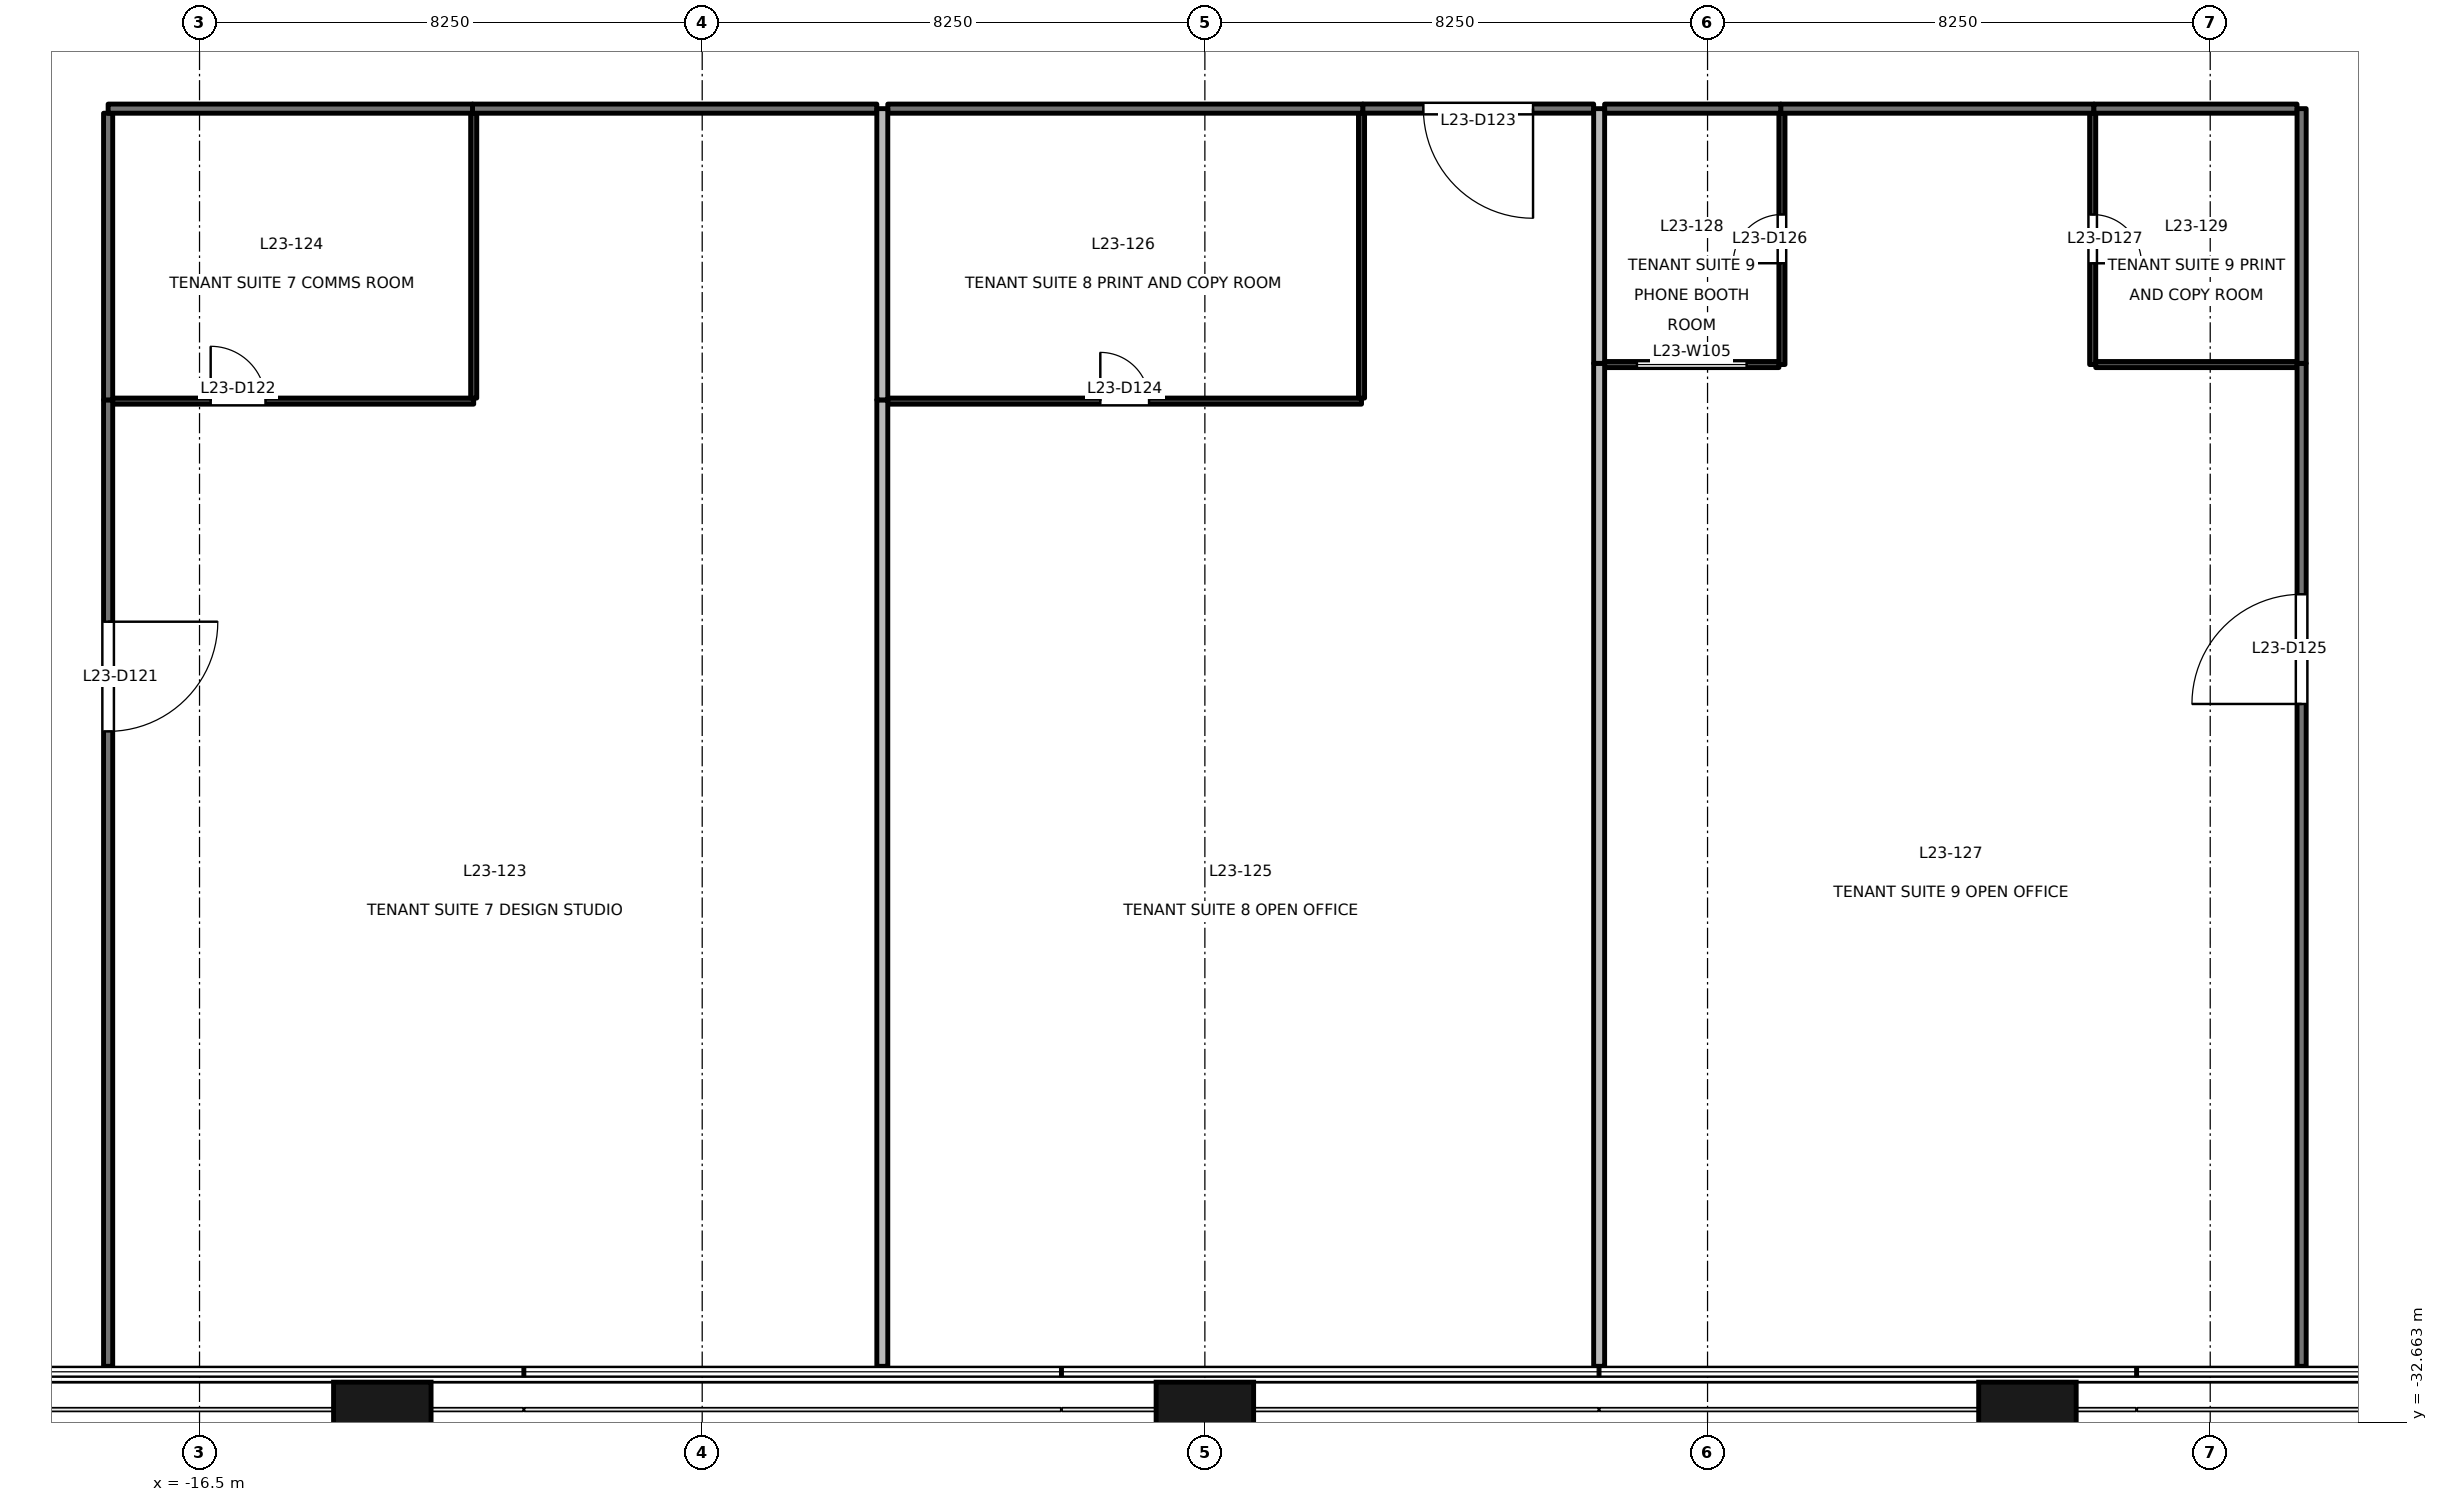
"""IFC4 building model, lengths in metres.
Left out: names, types, materials, properties, quantities, classifications, styles, units other than length and angle.
Written with IfcOpenShell. Run it as: python <this file> out.ifc"""

import sys

from ifc_helpers import new_model, si_unit, direction, frame, frame_2d, origin, origin_2d, place, context, subcontext, project, spatial, rectangle, extrude, element, fill, save


model = new_model("IFC4")
c1 = context("Model", 3, precision=1e-05, world=origin(), true_north=direction((0.0, 1.0)))
c2 = subcontext(c1, "Body", "Model", "MODEL_VIEW")
j1 = project(units=[si_unit("LENGTHUNIT", "METRE"), si_unit("PLANEANGLEUNIT", "RADIAN")], contexts=[c1])
p1 = place(None, origin())
s1 = spatial("IfcSite", under=j1, at=p1, CompositionType="ELEMENT")
p2 = place(p1, origin())
s2 = spatial("IfcBuilding", under=s1, at=p2, CompositionType="ELEMENT")
p3 = place(p2, frame((0.0, 0.0, 103.7)))
s3 = spatial("IfcBuildingStorey", under=s2, at=p3, CompositionType="ELEMENT", Elevation=103.7)
for number, where, z_axis, x_axis in (
    (1, (-13.5, -32.9, -0.2), (0.0, 0.0, 1.0), (1.0, 0.0, 0.0)),
    (2, (0.0, -32.9, -0.2), (0.0, 0.0, 1.0), (1.0, 0.0, 0.0)),
    (3, (13.5, -32.9, -0.2), (0.0, 0.0, 1.0), (1.0, 0.0, 0.0)),
):
    element("IfcColumn", number, at=place(p3, frame(where, z_axis=z_axis, x_axis=x_axis)), inside=s3, PredefinedType="COLUMN", context=c2, shape_type="SweptSolid", body=[
        extrude(rectangle(XDim=1.6, YDim=1.8, at=origin_2d()), origin(), (0.0, 0.0, 1.0), 4.0),
    ])
p4 = place(p3, frame((-18.0, -15.88, 0.0), z_axis=(0.0, 0.0, 1.0), x_axis=(0.0, -1.0, 0.0)))
e4 = element("IfcWall", 4, at=p4, inside=s3, PredefinedType="PARTITIONING", context=c2, shape_type="SweptSolid", body=[
    extrude(rectangle(XDim=15.86, YDim=0.15, at=frame_2d((7.93, 0.0))), origin(), (0.0, 0.0, 1.0), 3.8),
])
p5 = place(p4, frame((3.64, 0.0, 0.0)))
e5 = element("IfcOpeningElement", 5, at=p5, cuts=e4, PredefinedType="OPENING", context=c2, shape_type="SweptSolid", body=[
    extrude(rectangle(XDim=1.8, YDim=2.1, at=frame_2d((0.9, 1.05))), frame((0.0, 0.085, 0.0), z_axis=(0.0, -1.0, 0.0), x_axis=(1.0, 0.0, 0.0)), (0.0, 0.0, 1.0), 0.171),
])
p6 = place(p3, frame((-5.384, -11.1, 0.0), z_axis=(0.0, 0.0, 1.0), x_axis=(-1.0, 0.0, 0.0)))
e6 = element("IfcWall", 6, at=p6, inside=s3, PredefinedType="PARTITIONING", context=c2, shape_type="SweptSolid", body=[
    extrude(rectangle(XDim=6.636, YDim=0.15, at=frame_2d((3.318, 0.0))), origin(), (0.0, 0.0, 1.0), 2.8),
])
p7 = place(p3, frame((-18.0, -11.175, 0.0), z_axis=(0.0, 0.0, 1.0), x_axis=(0.0, -1.0, 0.0)))
e7 = element("IfcWall", 7, at=p7, inside=s3, PredefinedType="PARTITIONING", context=c2, shape_type="SweptSolid", body=[
    extrude(rectangle(XDim=4.705, YDim=0.15, at=frame_2d((2.353, 0.0))), origin(), (0.0, 0.0, 1.0), 3.8),
])
p8 = place(p3, frame((-12.02, -11.1, 0.0), z_axis=(0.0, 0.0, 1.0), x_axis=(-1.0, 0.0, 0.0)))
e8 = element("IfcWall", 8, at=p8, inside=s3, PredefinedType="PARTITIONING", context=c2, shape_type="SweptSolid", body=[
    extrude(rectangle(XDim=5.98, YDim=0.15, at=frame_2d((2.99, 0.0))), origin(), (0.0, 0.0, 1.0), 2.8),
])
p9 = place(p3, frame((6.381, -11.099, 0.0), z_axis=(0.0, 0.0, 1.0), x_axis=(-1.0, 0.0, 0.0)))
e9 = element("IfcWall", 9, at=p9, inside=s3, PredefinedType="PARTITIONING", context=c2, shape_type="SweptSolid", body=[
    extrude(rectangle(XDim=3.79, YDim=0.15, at=frame_2d((1.895, 0.0))), origin(), (0.0, 0.0, 1.0), 2.8),
])
p10 = place(p9, frame((0.995, 0.0, 0.0)))
e10 = element("IfcOpeningElement", 10, at=p10, cuts=e9, PredefinedType="OPENING", context=c2, shape_type="SweptSolid", body=[
    extrude(rectangle(XDim=1.8, YDim=2.1, at=frame_2d((0.9, 1.05))), frame((0.0, 0.085, 0.0), z_axis=(0.0, -1.0, 0.0), x_axis=(1.0, 0.0, 0.0)), (0.0, 0.0, 1.0), 0.171),
])
p11 = place(p3, frame((2.591, -11.1, 0.0), z_axis=(0.0, 0.0, 1.0), x_axis=(-1.0, 0.0, 0.0)))
e11 = element("IfcWall", 11, at=p11, inside=s3, PredefinedType="PARTITIONING", context=c2, shape_type="SweptSolid", body=[
    extrude(rectangle(XDim=7.795, YDim=0.15, at=frame_2d((3.897, 0.0))), origin(), (0.0, 0.0, 1.0), 2.8),
])
p12 = place(p3, frame((14.591, -11.1, 0.0), z_axis=(0.0, 0.0, 1.0), x_axis=(-1.0, 0.0, 0.0)))
e12 = element("IfcWall", 12, at=p12, inside=s3, PredefinedType="PARTITIONING", context=c2, shape_type="SweptSolid", body=[
    extrude(rectangle(XDim=5.14, YDim=0.15, at=frame_2d((2.57, 0.0))), origin(), (0.0, 0.0, 1.0), 2.8),
])
p13 = place(p3, frame((18.0, -31.74, 0.0), z_axis=(0.0, 0.0, 1.0), x_axis=(0.0, 1.0, 0.0)))
e13 = element("IfcWall", 13, at=p13, inside=s3, PredefinedType="PARTITIONING", context=c2, shape_type="SweptSolid", body=[
    extrude(rectangle(XDim=16.46, YDim=0.15, at=frame_2d((8.23, 0.0))), origin(), (0.0, 0.0, 1.0), 2.4),
])
p14 = place(p13, frame((10.87, 0.0, 0.0)))
e14 = element("IfcOpeningElement", 14, at=p14, cuts=e13, PredefinedType="OPENING", context=c2, shape_type="SweptSolid", body=[
    extrude(rectangle(XDim=1.8, YDim=2.1, at=frame_2d((0.9, 1.05))), frame((0.0, 0.085, 0.0), z_axis=(0.0, -1.0, 0.0), x_axis=(1.0, 0.0, 0.0)), (0.0, 0.0, 1.0), 0.171),
])
p15 = place(p3, frame((9.451, -11.1, 0.0), z_axis=(0.0, 0.0, 1.0), x_axis=(-1.0, 0.0, 0.0)))
e15 = element("IfcWall", 15, at=p15, inside=s3, PredefinedType="PARTITIONING", context=c2, shape_type="SweptSolid", body=[
    extrude(rectangle(XDim=2.89, YDim=0.15, at=frame_2d((1.445, 0.0))), origin(), (0.0, 0.0, 1.0), 2.8),
])
p16 = place(p3, frame((17.925, -11.1, 0.0), z_axis=(0.0, 0.0, 1.0), x_axis=(-1.0, 0.0, 0.0)))
e16 = element("IfcWall", 16, at=p16, inside=s3, PredefinedType="PARTITIONING", context=c2, shape_type="SweptSolid", body=[
    extrude(rectangle(XDim=3.334, YDim=0.15, at=frame_2d((1.667, 0.0))), origin(), (0.0, 0.0, 1.0), 2.4),
])
p17 = place(p3, frame((18.0, -15.28, 0.0), z_axis=(0.0, 0.0, 1.0), x_axis=(0.0, 1.0, 0.0)))
e17 = element("IfcWall", 17, at=p17, inside=s3, PredefinedType="PARTITIONING", context=c2, shape_type="SweptSolid", body=[
    extrude(rectangle(XDim=4.18, YDim=0.15, at=frame_2d((2.09, 0.0))), origin(), (0.0, 0.0, 1.0), 2.4),
])
p18 = place(p3, frame((-17.925, -15.9, 0.0), z_axis=(0.0, 0.0, 1.0), x_axis=(1.0, 0.0, 0.0)))
e18 = element("IfcWall", 18, at=p18, inside=s3, PredefinedType="PARTITIONING", context=c2, shape_type="SweptSolid", body=[
    extrude(rectangle(XDim=5.925, YDim=0.1, at=frame_2d((2.962, 0.0))), origin(), (0.0, 0.0, 1.0), 2.8),
])
p19 = place(p18, frame((1.608, 0.0, 0.0)))
e19 = element("IfcOpeningElement", 19, at=p19, cuts=e18, PredefinedType="OPENING", context=c2, shape_type="SweptSolid", body=[
    extrude(rectangle(XDim=0.9, YDim=2.1, at=frame_2d((0.45, 1.05))), frame((0.0, 0.061, 0.0), z_axis=(0.0, -1.0, 0.0), x_axis=(1.0, 0.0, 0.0)), (0.0, 0.0, 1.0), 0.121),
])
p20 = place(p3, frame((-12.0, -15.85, 0.0), z_axis=(0.0, 0.0, 1.0), x_axis=(0.0, 1.0, 0.0)))
e20 = element("IfcWall", 20, at=p20, inside=s3, PredefinedType="PARTITIONING", context=c2, shape_type="SweptSolid", body=[
    extrude(rectangle(XDim=4.675, YDim=0.1, at=frame_2d((2.337, 0.0))), origin(), (0.0, 0.0, 1.0), 3.8),
])
p21 = place(p3, frame((-5.294, -15.88, 0.0), z_axis=(0.0, 0.0, 1.0), x_axis=(0.0, -1.0, 0.0)))
e21 = element("IfcWall", 21, at=p21, inside=s3, PredefinedType="PARTITIONING", context=c2, shape_type="SweptSolid", body=[
    extrude(rectangle(XDim=15.86, YDim=0.18, at=frame_2d((7.93, 0.0))), origin(), (0.0, 0.0, 1.0), 3.8),
])
p22 = place(p3, frame((-5.294, -11.1, 0.0), z_axis=(0.0, 0.0, 1.0), x_axis=(0.0, -1.0, 0.0)))
e22 = element("IfcWall", 22, at=p22, inside=s3, PredefinedType="PARTITIONING", context=c2, shape_type="SweptSolid", body=[
    extrude(rectangle(XDim=4.78, YDim=0.18, at=frame_2d((2.39, 0.0))), origin(), (0.0, 0.0, 1.0), 3.8),
])
p23 = place(p3, frame((-5.204, -15.9, 0.0), z_axis=(0.0, 0.0, 1.0), x_axis=(1.0, 0.0, 0.0)))
e23 = element("IfcWall", 23, at=p23, inside=s3, PredefinedType="PARTITIONING", context=c2, shape_type="SweptSolid", body=[
    extrude(rectangle(XDim=7.775, YDim=0.1, at=frame_2d((3.888, 0.0))), origin(), (0.0, 0.0, 1.0), 2.8),
])
p24 = place(p23, frame((3.488, 0.0, 0.0)))
e24 = element("IfcOpeningElement", 24, at=p24, cuts=e23, PredefinedType="OPENING", context=c2, shape_type="SweptSolid", body=[
    extrude(rectangle(XDim=0.8, YDim=2.1, at=frame_2d((0.4, 1.05))), frame((0.0, 0.061, 0.0), z_axis=(0.0, -1.0, 0.0), x_axis=(1.0, 0.0, 0.0)), (0.0, 0.0, 1.0), 0.121),
])
p25 = place(p3, frame((2.571, -15.85, 0.0), z_axis=(0.0, 0.0, 1.0), x_axis=(0.0, 1.0, 0.0)))
e25 = element("IfcWall", 25, at=p25, inside=s3, PredefinedType="PARTITIONING", context=c2, shape_type="SweptSolid", body=[
    extrude(rectangle(XDim=4.675, YDim=0.1, at=frame_2d((2.337, 0.0))), origin(), (0.0, 0.0, 1.0), 3.8),
])
p26 = place(p3, frame((6.471, -15.28, 0.0), z_axis=(0.0, 0.0, 1.0), x_axis=(0.0, -1.0, 0.0)))
e26 = element("IfcWall", 26, at=p26, inside=s3, PredefinedType="PARTITIONING", context=c2, shape_type="SweptSolid", body=[
    extrude(rectangle(XDim=16.46, YDim=0.18, at=frame_2d((8.23, 0.0))), origin(), (0.0, 0.0, 1.0), 3.8),
])
p27 = place(p3, frame((6.471, -11.1, 0.0), z_axis=(0.0, 0.0, 1.0), x_axis=(0.0, -1.0, 0.0)))
e27 = element("IfcWall", 27, at=p27, inside=s3, PredefinedType="PARTITIONING", context=c2, shape_type="SweptSolid", body=[
    extrude(rectangle(XDim=4.18, YDim=0.18, at=frame_2d((2.09, 0.0))), origin(), (0.0, 0.0, 1.0), 3.8),
])
p28 = place(p3, frame((6.561, -15.3, 0.0), z_axis=(0.0, 0.0, 1.0), x_axis=(1.0, 0.0, 0.0)))
e28 = element("IfcWall", 28, at=p28, inside=s3, PredefinedType="PARTITIONING", context=c2, shape_type="SweptSolid", body=[
    extrude(rectangle(XDim=2.86, YDim=0.1, at=frame_2d((1.43, 0.0))), origin(), (0.0, 0.0, 1.0), 2.8),
])
p29 = place(p28, frame((0.53, 0.0, 0.9)))
e29 = element("IfcOpeningElement", 29, at=p29, cuts=e28, PredefinedType="OPENING", context=c2, shape_type="SweptSolid", body=[
    extrude(rectangle(XDim=1.8, YDim=1.2, at=frame_2d((0.9, 0.6))), frame((0.0, 0.061, 0.0), z_axis=(0.0, -1.0, 0.0), x_axis=(1.0, 0.0, 0.0)), (0.0, 0.0, 1.0), 0.121),
])
p30 = place(p3, frame((9.471, -15.3, 0.0), z_axis=(0.0, 0.0, 1.0), x_axis=(0.0, 1.0, 0.0)))
e30 = element("IfcWall", 30, at=p30, inside=s3, PredefinedType="PARTITIONING", context=c2, shape_type="SweptSolid", body=[
    extrude(rectangle(XDim=4.125, YDim=0.1, at=frame_2d((2.062, 0.0))), origin(), (0.0, 0.0, 1.0), 3.8),
])
p31 = place(p30, frame((1.663, 0.0, 0.0)))
e31 = element("IfcOpeningElement", 31, at=p31, cuts=e30, PredefinedType="OPENING", context=c2, shape_type="SweptSolid", body=[
    extrude(rectangle(XDim=0.8, YDim=2.1, at=frame_2d((0.4, 1.05))), frame((0.0, 0.061, 0.0), z_axis=(0.0, -1.0, 0.0), x_axis=(1.0, 0.0, 0.0)), (0.0, 0.0, 1.0), 0.121),
])
p32 = place(p3, frame((14.571, -11.175, 0.0), z_axis=(0.0, 0.0, 1.0), x_axis=(0.0, -1.0, 0.0)))
e32 = element("IfcWall", 32, at=p32, inside=s3, PredefinedType="PARTITIONING", context=c2, shape_type="SweptSolid", body=[
    extrude(rectangle(XDim=4.125, YDim=0.1, at=frame_2d((2.062, 0.0))), origin(), (0.0, 0.0, 1.0), 3.8),
])
p33 = place(p32, frame((1.663, 0.0, 0.0)))
e33 = element("IfcOpeningElement", 33, at=p33, cuts=e32, PredefinedType="OPENING", context=c2, shape_type="SweptSolid", body=[
    extrude(rectangle(XDim=0.8, YDim=2.1, at=frame_2d((0.4, 1.05))), frame((0.0, 0.061, 0.0), z_axis=(0.0, -1.0, 0.0), x_axis=(1.0, 0.0, 0.0)), (0.0, 0.0, 1.0), 0.121),
])
p34 = place(p3, frame((14.621, -15.3, 0.0), z_axis=(0.0, 0.0, 1.0), x_axis=(1.0, 0.0, 0.0)))
e34 = element("IfcWall", 34, at=p34, inside=s3, PredefinedType="PARTITIONING", context=c2, shape_type="SweptSolid", body=[
    extrude(rectangle(XDim=3.304, YDim=0.1, at=frame_2d((1.652, 0.0))), origin(), (0.0, 0.0, 1.0), 2.4),
])
p35 = place(p5, origin())
e35 = element("IfcDoor", 35, at=p35, inside=s3, OperationType="DOUBLE_DOOR_SINGLE_SWING", PredefinedType="DOOR", context=c2, shape_type="SweptSolid", body=[
    extrude(rectangle(XDim=1.8, YDim=2.1, at=frame_2d((0.9, 1.05))), frame((0.0, 0.025, 0.0), z_axis=(0.0, -1.0, 0.0), x_axis=(1.0, 0.0, 0.0)), (0.0, 0.0, 1.0), 0.05),
])
fill(e5, e35)
p36 = place(p19, origin())
e36 = element("IfcDoor", 36, at=p36, inside=s3, OperationType="SINGLE_SWING_LEFT", PredefinedType="DOOR", context=c2, shape_type="SweptSolid", body=[
    extrude(rectangle(XDim=0.9, YDim=2.1, at=frame_2d((0.45, 1.05))), frame((0.0, 0.025, 0.0), z_axis=(0.0, -1.0, 0.0), x_axis=(1.0, 0.0, 0.0)), (0.0, 0.0, 1.0), 0.05),
])
fill(e19, e36)
p37 = place(p10, origin())
e37 = element("IfcDoor", 37, at=p37, inside=s3, OperationType="DOUBLE_DOOR_SINGLE_SWING", PredefinedType="DOOR", context=c2, shape_type="SweptSolid", body=[
    extrude(rectangle(XDim=1.8, YDim=2.1, at=frame_2d((0.9, 1.05))), frame((0.0, 0.025, 0.0), z_axis=(0.0, -1.0, 0.0), x_axis=(1.0, 0.0, 0.0)), (0.0, 0.0, 1.0), 0.05),
])
fill(e10, e37)
p38 = place(p24, origin())
e38 = element("IfcDoor", 38, at=p38, inside=s3, OperationType="SINGLE_SWING_LEFT", PredefinedType="DOOR", context=c2, shape_type="SweptSolid", body=[
    extrude(rectangle(XDim=0.8, YDim=2.1, at=frame_2d((0.4, 1.05))), frame((0.0, 0.025, 0.0), z_axis=(0.0, -1.0, 0.0), x_axis=(1.0, 0.0, 0.0)), (0.0, 0.0, 1.0), 0.05),
])
fill(e24, e38)
p39 = place(p14, origin())
e39 = element("IfcDoor", 39, at=p39, inside=s3, OperationType="DOUBLE_DOOR_SINGLE_SWING", PredefinedType="DOOR", context=c2, shape_type="SweptSolid", body=[
    extrude(rectangle(XDim=1.8, YDim=2.1, at=frame_2d((0.9, 1.05))), frame((0.0, 0.025, 0.0), z_axis=(0.0, -1.0, 0.0), x_axis=(1.0, 0.0, 0.0)), (0.0, 0.0, 1.0), 0.05),
])
fill(e14, e39)
p40 = place(p31, origin())
e40 = element("IfcDoor", 40, at=p40, inside=s3, OperationType="SINGLE_SWING_LEFT", PredefinedType="DOOR", context=c2, shape_type="SweptSolid", body=[
    extrude(rectangle(XDim=0.8, YDim=2.1, at=frame_2d((0.4, 1.05))), frame((0.0, 0.025, 0.0), z_axis=(0.0, -1.0, 0.0), x_axis=(1.0, 0.0, 0.0)), (0.0, 0.0, 1.0), 0.05),
])
fill(e31, e40)
p41 = place(p33, origin())
e41 = element("IfcDoor", 41, at=p41, inside=s3, OperationType="SINGLE_SWING_RIGHT", PredefinedType="DOOR", context=c2, shape_type="SweptSolid", body=[
    extrude(rectangle(XDim=0.8, YDim=2.1, at=frame_2d((0.4, 1.05))), frame((0.0, 0.025, 0.0), z_axis=(0.0, -1.0, 0.0), x_axis=(1.0, 0.0, 0.0)), (0.0, 0.0, 1.0), 0.05),
])
fill(e33, e41)
p42 = place(p29, origin())
e42 = element("IfcWindow", 42, at=p42, inside=s3, PartitioningType="SINGLE_PANEL", PredefinedType="WINDOW", context=c2, shape_type="SweptSolid", body=[
    extrude(rectangle(XDim=1.8, YDim=1.2, at=frame_2d((0.9, 0.6))), frame((0.0, 0.03, 0.0), z_axis=(0.0, -1.0, 0.0), x_axis=(1.0, 0.0, 0.0)), (0.0, 0.0, 1.0), 0.06),
])
fill(e29, e42)
save(model, sys.argv[1])
